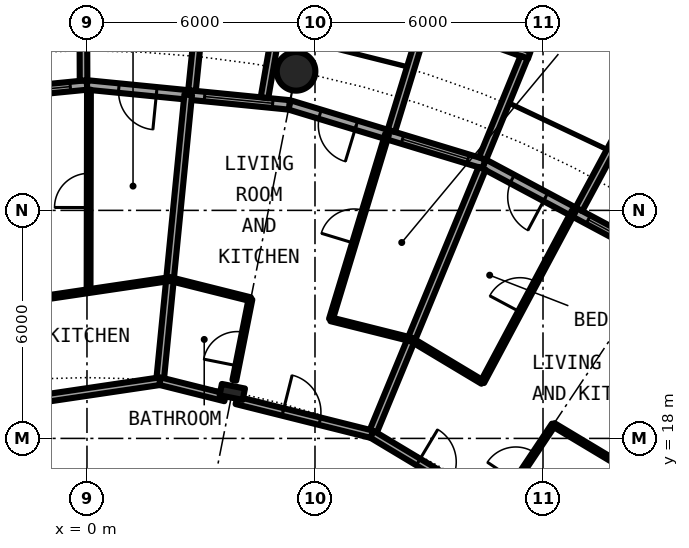
"""IFC4 building model, lengths in metres.
Left out: names, types, materials, properties, quantities, classifications, styles, units other than length and angle.
Written with IfcOpenShell. Run it as: python <this file> out.ifc"""

import sys

from ifc_helpers import new_model, si_unit, direction, frame, frame_2d, origin, origin_2d, place, context, subcontext, project, spatial, rectangle, circle, hollow_circle, i_section, extrude, element, fill, save


model = new_model("IFC4")
c1 = context("Model", 3, precision=1e-05, world=origin(), true_north=direction((0.0, 1.0)))
c2 = subcontext(c1, "Body", "Model", "MODEL_VIEW")
j1 = project(units=[si_unit("LENGTHUNIT", "METRE"), si_unit("PLANEANGLEUNIT", "RADIAN")], contexts=[c1])
p1 = place(None, origin())
s1 = spatial("IfcSite", under=j1, at=p1, CompositionType="ELEMENT")
p2 = place(p1, origin())
s2 = spatial("IfcBuilding", under=s1, at=p2, CompositionType="ELEMENT")
p3 = place(p2, frame((0.0, 0.0, 28.9)))
s3 = spatial("IfcBuildingStorey", under=s2, at=p3, CompositionType="ELEMENT", Elevation=28.9)
p4 = place(p3, frame((5.501, 27.658, 0.0), z_axis=(0.0, 0.0, 1.0), x_axis=(1.0, 0.0, 0.0)))
e1 = element("IfcColumn", 1, at=p4, inside=s3, PredefinedType="COLUMN", context=c2, shape_type="SweptSolid", body=[
    extrude(hollow_circle(Radius=0.508, WallThickness=0.05, at=origin_2d()), origin(), (0.0, 0.0, 1.0), 3.05),
])
p5 = place(p3, frame((3.824, 19.223, 0.0), z_axis=(0.0, 0.0, 1.0), x_axis=(0.195090322016, 0.980785280403, 0.0)))
e2 = element("IfcColumn", 2, at=p5, inside=s3, PredefinedType="COLUMN", context=c2, shape_type="SweptSolid", body=[
    extrude(i_section(OverallWidth=0.305, OverallDepth=0.62, WebThickness=0.021, FlangeThickness=0.04, FilletRadius=0.027, at=origin_2d()), origin(), (0.0, 0.0, 1.0), 3.05),
])
p6 = place(p3, frame((15.167, 22.699, 0.0), z_axis=(0.0, 0.0, 1.0), x_axis=(-0.881915646801, 0.471407246368, 0.0)))
e3 = element("IfcWall", 3, at=p6, inside=s3, PredefinedType="SOLIDWALL", context=c2, shape_type="SweptSolid", body=[
    extrude(rectangle(XDim=5.352, YDim=0.25, at=frame_2d((2.676, 0.0))), origin(), (0.0, 0.0, 1.0), 2.7),
])
p7 = place(p6, frame((0.441, 0.0, 0.3)))
e4 = element("IfcOpeningElement", 4, at=p7, cuts=e3, PredefinedType="OPENING", context=c2, shape_type="SweptSolid", body=[
    extrude(rectangle(XDim=1.8, YDim=2.1, at=frame_2d((0.9, 1.05))), frame((0.0, 0.135, 0.0), z_axis=(0.0, -1.0, 0.0), x_axis=(1.0, 0.0, 0.0)), (0.0, 0.0, 1.0), 0.27),
])
p8 = place(p6, frame((3.51, 0.0, 0.0)))
e5 = element("IfcOpeningElement", 5, at=p8, cuts=e3, PredefinedType="OPENING", context=c2, shape_type="SweptSolid", body=[
    extrude(rectangle(XDim=1.0, YDim=2.2, at=frame_2d((0.5, 1.1))), frame((0.0, 0.135, 0.0), z_axis=(0.0, -1.0, 0.0), x_axis=(1.0, 0.0, 0.0)), (0.0, 0.0, 1.0), 0.27),
])
p9 = place(p3, frame((12.945, 24.029, -0.03), z_axis=(0.0, 0.0, 1.0), x_axis=(0.474424310775, 0.88029629861, 0.0)))
e6 = element("IfcWall", 6, at=p9, inside=s3, PredefinedType="SOLIDWALL", context=c2, shape_type="SweptSolid", body=[
    extrude(rectangle(XDim=3.006, YDim=0.2, at=frame_2d((1.503, 0.0))), origin(), (0.0, 0.0, 1.0), 2.73),
])
p10 = place(p3, frame((10.447, 25.222, 0.0), z_axis=(0.0, 0.0, 1.0), x_axis=(-0.956965678721, 0.290201119486, 0.0)))
e7 = element("IfcWall", 7, at=p10, inside=s3, PredefinedType="SOLIDWALL", context=c2, shape_type="SweptSolid", body=[
    extrude(rectangle(XDim=5.351, YDim=0.25, at=frame_2d((2.676, 0.0))), origin(), (0.0, 0.0, 1.0), 2.7),
])
p11 = place(p10, frame((0.441, 0.0, 0.3)))
e8 = element("IfcOpeningElement", 8, at=p11, cuts=e7, PredefinedType="OPENING", context=c2, shape_type="SweptSolid", body=[
    extrude(rectangle(XDim=1.8, YDim=2.1, at=frame_2d((0.9, 1.05))), frame((0.0, 0.135, 0.0), z_axis=(0.0, -1.0, 0.0), x_axis=(1.0, 0.0, 0.0)), (0.0, 0.0, 1.0), 0.27),
])
p12 = place(p10, frame((3.51, 0.0, 0.0)))
e9 = element("IfcOpeningElement", 9, at=p12, cuts=e7, PredefinedType="OPENING", context=c2, shape_type="SweptSolid", body=[
    extrude(rectangle(XDim=1.0, YDim=2.2, at=frame_2d((0.5, 1.1))), frame((0.0, 0.135, 0.0), z_axis=(0.0, -1.0, 0.0), x_axis=(1.0, 0.0, 0.0)), (0.0, 0.0, 1.0), 0.27),
])
p13 = place(p3, frame((11.638, 28.084, -0.03), z_axis=(0.0, 0.0, 1.0), x_axis=(-0.941461077774, 0.337121697664, 0.0)))
e10 = element("IfcWall", 10, at=p13, inside=s3, PredefinedType="SOLIDWALL", context=c2, shape_type="SweptSolid", body=[
    extrude(rectangle(XDim=2.993, YDim=0.2, at=frame_2d((1.497, 0.0))), origin(), (0.0, 0.0, 1.0), 2.73),
])
p14 = place(p13, frame((0.457, 0.0, 0.33)))
e11 = element("IfcOpeningElement", 11, at=p14, cuts=e10, PredefinedType="OPENING", context=c2, shape_type="SweptSolid", body=[
    extrude(circle(Radius=1.04, at=frame_2d((1.04, 1.04))), frame((0.0, 0.11, 0.0), z_axis=(0.0, -1.0, 0.0), x_axis=(1.0, 0.0, 0.0)), (0.0, 0.0, 1.0), 0.22),
])
p15 = place(p3, frame((10.409, 25.364, -0.03), z_axis=(0.0, 0.0, 1.0), x_axis=(0.379509886562, 0.925187681501, 0.0)))
e12 = element("IfcWall", 12, at=p15, inside=s3, PredefinedType="SOLIDWALL", context=c2, shape_type="SweptSolid", body=[
    extrude(rectangle(XDim=2.883, YDim=0.2, at=frame_2d((1.441, 0.0))), origin(), (0.0, 0.0, 1.0), 2.73),
])
p16 = place(p3, frame((8.009, 26.092, -0.03), z_axis=(0.0, 0.0, 1.0), x_axis=(0.293406695073, 0.955987715029, 0.0)))
e13 = element("IfcWall", 13, at=p16, inside=s3, PredefinedType="SOLIDWALL", context=c2, shape_type="SweptSolid", body=[
    extrude(rectangle(XDim=3.006, YDim=0.2, at=frame_2d((1.503, 0.0))), origin(), (0.0, 0.0, 1.0), 2.73),
])
p17 = place(p3, frame((5.326, 26.775, 0.0), z_axis=(0.0, 0.0, 1.0), x_axis=(-0.995173996315, 0.098126026407, 0.0)))
e14 = element("IfcWall", 14, at=p17, inside=s3, PredefinedType="SOLIDWALL", context=c2, shape_type="SweptSolid", body=[
    extrude(rectangle(XDim=5.352, YDim=0.25, at=frame_2d((2.676, 0.0))), origin(), (0.0, 0.0, 1.0), 2.7),
])
p18 = place(p17, frame((0.441, 0.0, 0.3)))
e15 = element("IfcOpeningElement", 15, at=p18, cuts=e14, PredefinedType="OPENING", context=c2, shape_type="SweptSolid", body=[
    extrude(rectangle(XDim=1.8, YDim=2.1, at=frame_2d((0.9, 1.05))), frame((0.0, 0.135, 0.0), z_axis=(0.0, -1.0, 0.0), x_axis=(1.0, 0.0, 0.0)), (0.0, 0.0, 1.0), 0.27),
])
p19 = place(p17, frame((3.51, 0.0, 0.0)))
e16 = element("IfcOpeningElement", 16, at=p19, cuts=e14, PredefinedType="OPENING", context=c2, shape_type="SweptSolid", body=[
    extrude(rectangle(XDim=1.0, YDim=2.2, at=frame_2d((0.5, 1.1))), frame((0.0, 0.135, 0.0), z_axis=(0.0, -1.0, 0.0), x_axis=(1.0, 0.0, 0.0)), (0.0, 0.0, 1.0), 0.27),
])
p20 = place(p3, frame((4.671, 26.966, -0.03), z_axis=(0.0, 0.0, 1.0), x_axis=(0.170539878907, 0.985350774954, 0.0)))
e17 = element("IfcWall", 17, at=p20, inside=s3, PredefinedType="SOLIDWALL", context=c2, shape_type="SweptSolid", body=[
    extrude(rectangle(XDim=2.932, YDim=0.2, at=frame_2d((1.466, 0.0))), origin(), (0.0, 0.0, 1.0), 2.73),
])
p21 = place(p3, frame((2.764, 27.153, -0.03), z_axis=(0.0, 0.0, 1.0), x_axis=(0.101505487237, 0.994834979311, 0.0)))
e18 = element("IfcWall", 18, at=p21, inside=s3, PredefinedType="SOLIDWALL", context=c2, shape_type="SweptSolid", body=[
    extrude(rectangle(XDim=3.007, YDim=0.2, at=frame_2d((1.503, 0.0))), origin(), (0.0, 0.0, 1.0), 2.73),
])
p22 = place(p3, frame((0.0, 27.3, 0.0), z_axis=(0.0, 0.0, 1.0), x_axis=(-0.995173996315, -0.098126026407, 0.0)))
e19 = element("IfcWall", 19, at=p22, inside=s3, PredefinedType="SOLIDWALL", context=c2, shape_type="SweptSolid", body=[
    extrude(rectangle(XDim=5.352, YDim=0.25, at=frame_2d((2.676, 0.0))), origin(), (0.0, 0.0, 1.0), 2.7),
])
p23 = place(p22, frame((0.441, 0.0, 0.3)))
e20 = element("IfcOpeningElement", 20, at=p23, cuts=e19, PredefinedType="OPENING", context=c2, shape_type="SweptSolid", body=[
    extrude(rectangle(XDim=1.8, YDim=2.1, at=frame_2d((0.9, 1.05))), frame((0.0, 0.135, 0.0), z_axis=(0.0, -1.0, 0.0), x_axis=(1.0, 0.0, 0.0)), (0.0, 0.0, 1.0), 0.27),
])
p24 = place(p22, frame((3.51, 0.0, 0.0)))
e21 = element("IfcOpeningElement", 21, at=p24, cuts=e19, PredefinedType="OPENING", context=c2, shape_type="SweptSolid", body=[
    extrude(rectangle(XDim=1.0, YDim=2.2, at=frame_2d((0.5, 1.1))), frame((0.0, 0.135, 0.0), z_axis=(0.0, -1.0, 0.0), x_axis=(1.0, 0.0, 0.0)), (0.0, 0.0, 1.0), 0.27),
])
p25 = place(p3, frame((-0.09, 27.417, -0.03), z_axis=(0.0, 0.0, 1.0), x_axis=(-0.00347308367, 0.999993968827, 0.0)))
e22 = element("IfcWall", 22, at=p25, inside=s3, PredefinedType="SOLIDWALL", context=c2, shape_type="SweptSolid", body=[
    extrude(rectangle(XDim=2.882, YDim=0.2, at=frame_2d((1.441, 0.0))), origin(), (0.0, 0.0, 1.0), 2.73),
])
p26 = place(p3, frame((0.042, 21.875, 0.0), z_axis=(0.0, 0.0, 1.0), x_axis=(0.001888614256, 0.999998216567, 0.0)))
e23 = element("IfcWall", 23, at=p26, inside=s3, PredefinedType="PARTITIONING", context=c2, shape_type="SweptSolid", body=[
    extrude(rectangle(XDim=5.3, YDim=0.1, at=frame_2d((2.65, 0.0))), origin(), (0.0, 0.0, 1.0), 2.7),
])
p27 = place(p26, frame((2.2, 0.0, 0.0)))
e24 = element("IfcOpeningElement", 24, at=p27, cuts=e23, PredefinedType="OPENING", context=c2, shape_type="SweptSolid", body=[
    extrude(rectangle(XDim=0.9, YDim=2.3, at=frame_2d((0.45, 1.15))), frame((0.0, 0.06, 0.0), z_axis=(0.0, -1.0, 0.0), x_axis=(1.0, 0.0, 0.0)), (0.0, 0.0, 1.0), 0.12),
])
p28 = place(p3, frame((1.921, 19.506, 0.0), z_axis=(0.0, 0.0, 1.0), x_axis=(0.098115395479, 0.995175044487, 0.0)))
e25 = element("IfcWall", 25, at=p28, inside=s3, PredefinedType="PARTITIONING", context=c2, shape_type="SweptSolid", body=[
    extrude(rectangle(XDim=7.574, YDim=0.2, at=frame_2d((3.787, 0.0))), origin(), (0.0, 0.0, 1.0), 2.7),
])
p29 = place(p3, frame((3.878, 19.529, 0.0), z_axis=(0.0, 0.0, 1.0), x_axis=(0.194907578226, 0.980821612706, 0.0)))
e26 = element("IfcWall", 26, at=p29, inside=s3, PredefinedType="PARTITIONING", context=c2, shape_type="SweptSolid", body=[
    extrude(rectangle(XDim=2.176, YDim=0.1, at=frame_2d((1.088, 0.0))), origin(), (0.0, 0.0, 1.0), 2.7),
])
p30 = place(p29, frame((0.389, 0.0, 0.0)))
e27 = element("IfcOpeningElement", 27, at=p30, cuts=e26, PredefinedType="OPENING", context=c2, shape_type="SweptSolid", body=[
    extrude(rectangle(XDim=0.9, YDim=2.3, at=frame_2d((0.45, 1.15))), frame((0.0, 0.06, 0.0), z_axis=(0.0, -1.0, 0.0), x_axis=(1.0, 0.0, 0.0)), (0.0, 0.0, 1.0), 0.12),
])
p31 = place(p3, frame((6.418, 21.133, 0.0), z_axis=(0.0, 0.0, 1.0), x_axis=(0.290651827018, 0.956828885147, 0.0)))
e28 = element("IfcWall", 28, at=p31, inside=s3, PredefinedType="PARTITIONING", context=c2, shape_type="SweptSolid", body=[
    extrude(rectangle(XDim=5.089, YDim=0.1, at=frame_2d((2.544, 0.0))), origin(), (0.0, 0.0, 1.0), 2.7),
])
p32 = place(p31, frame((2.094, 0.0, 0.0)))
e29 = element("IfcOpeningElement", 29, at=p32, cuts=e28, PredefinedType="OPENING", context=c2, shape_type="SweptSolid", body=[
    extrude(rectangle(XDim=0.9, YDim=2.3, at=frame_2d((0.45, 1.15))), frame((0.0, 0.06, 0.0), z_axis=(0.0, -1.0, 0.0), x_axis=(1.0, 0.0, 0.0)), (0.0, 0.0, 1.0), 0.12),
])
p33 = place(p3, frame((7.501, 18.108, 0.0), z_axis=(0.0, 0.0, 1.0), x_axis=(0.382490346157, 0.923959487801, 0.0)))
e30 = element("IfcWall", 30, at=p33, inside=s3, PredefinedType="PARTITIONING", context=c2, shape_type="SweptSolid", body=[
    extrude(rectangle(XDim=7.574, YDim=0.2, at=frame_2d((3.787, 0.0))), origin(), (0.0, 0.0, 1.0), 2.7),
])
p34 = place(p3, frame((10.405, 19.481, 0.0), z_axis=(0.0, 0.0, 1.0), x_axis=(0.471170755767, 0.882042016522, 0.0)))
e31 = element("IfcWall", 31, at=p34, inside=s3, PredefinedType="PARTITIONING", context=c2, shape_type="SweptSolid", body=[
    extrude(rectangle(XDim=5.089, YDim=0.1, at=frame_2d((2.545, 0.0))), origin(), (0.0, 0.0, 1.0), 2.7),
])
p35 = place(p34, frame((2.095, 0.0, 0.0)))
e32 = element("IfcOpeningElement", 32, at=p35, cuts=e31, PredefinedType="OPENING", context=c2, shape_type="SweptSolid", body=[
    extrude(rectangle(XDim=0.9, YDim=2.3, at=frame_2d((0.45, 1.15))), frame((0.0, 0.06, 0.0), z_axis=(0.0, -1.0, 0.0), x_axis=(1.0, 0.0, 0.0)), (0.0, 0.0, 1.0), 0.12),
])
p36 = place(p3, frame((11.067, 16.551, 0.0), z_axis=(0.0, 0.0, 1.0), x_axis=(0.55563200073, 0.831428337119, 0.0)))
e33 = element("IfcWall", 33, at=p36, inside=s3, PredefinedType="PARTITIONING", context=c2, shape_type="SweptSolid", body=[
    extrude(rectangle(XDim=2.176, YDim=0.1, at=frame_2d((1.088, 0.0))), origin(), (0.0, 0.0, 1.0), 2.7),
])
p37 = place(p36, frame((0.389, 0.0, 0.0)))
e34 = element("IfcOpeningElement", 34, at=p37, cuts=e33, PredefinedType="OPENING", context=c2, shape_type="SweptSolid", body=[
    extrude(rectangle(XDim=0.9, YDim=2.3, at=frame_2d((0.45, 1.15))), frame((0.0, 0.06, 0.0), z_axis=(0.0, -1.0, 0.0), x_axis=(1.0, 0.0, 0.0)), (0.0, 0.0, 1.0), 0.12),
])
p38 = place(p3, frame((12.434, 15.151, 0.0), z_axis=(0.0, 0.0, 1.0), x_axis=(0.634381303318, 0.773020285633, 0.0)))
e35 = element("IfcWall", 35, at=p38, inside=s3, PredefinedType="PARTITIONING", context=c2, shape_type="SweptSolid", body=[
    extrude(rectangle(XDim=7.576, YDim=0.2, at=frame_2d((3.788, 0.0))), origin(), (0.0, 0.0, 1.0), 2.7),
])
p39 = place(p3, frame((-7.501, 18.108, 0.0), z_axis=(0.0, 0.0, 1.0), x_axis=(0.989167514259, 0.146791105777, 0.0)))
e36 = element("IfcWall", 36, at=p39, inside=s3, PredefinedType="PARTITIONING", context=c2, shape_type="SweptSolid", body=[
    extrude(rectangle(XDim=9.525, YDim=0.2, at=frame_2d((4.763, 0.0))), origin(), (0.0, 0.0, 1.0), 2.38),
])
p40 = place(p39, frame((2.355, 0.0, 0.0)))
e37 = element("IfcOpeningElement", 37, at=p40, cuts=e36, PredefinedType="OPENING", context=c2, shape_type="SweptSolid", body=[
    extrude(rectangle(XDim=1.0, YDim=2.3, at=frame_2d((0.5, 1.15))), frame((0.0, 0.11, 0.0), z_axis=(0.0, -1.0, 0.0), x_axis=(1.0, 0.0, 0.0)), (0.0, 0.0, 1.0), 0.22),
])
p41 = place(p3, frame((1.921, 19.506, 0.0), z_axis=(0.0, 0.0, 1.0), x_axis=(0.970053237222, -0.242892397895, 0.0)))
e38 = element("IfcWall", 38, at=p41, inside=s3, PredefinedType="PARTITIONING", context=c2, shape_type="SweptSolid", body=[
    extrude(rectangle(XDim=1.771, YDim=0.2, at=frame_2d((0.885, 0.0))), origin(), (0.0, 0.0, 1.0), 2.38),
])
p42 = place(p3, frame((3.935, 19.001, 0.0), z_axis=(0.0, 0.0, 1.0), x_axis=(0.970040840928, -0.242941900323, 0.0)))
e39 = element("IfcWall", 39, at=p42, inside=s3, PredefinedType="PARTITIONING", context=c2, shape_type="SweptSolid", body=[
    extrude(rectangle(XDim=3.676, YDim=0.2, at=frame_2d((1.838, 0.0))), origin(), (0.0, 0.0, 1.0), 2.38),
])
p43 = place(p42, frame((1.259, 0.0, 0.0)))
e40 = element("IfcOpeningElement", 40, at=p43, cuts=e39, PredefinedType="OPENING", context=c2, shape_type="SweptSolid", body=[
    extrude(rectangle(XDim=1.0, YDim=2.3, at=frame_2d((0.5, 1.15))), frame((0.0, 0.11, 0.0), z_axis=(0.0, -1.0, 0.0), x_axis=(1.0, 0.0, 0.0)), (0.0, 0.0, 1.0), 0.22),
])
p44 = place(p3, frame((7.501, 18.108, 0.0), z_axis=(0.0, 0.0, 1.0), x_axis=(0.857656999296, -0.514222200569, 0.0)))
e41 = element("IfcWall", 41, at=p44, inside=s3, PredefinedType="PARTITIONING", context=c2, shape_type="SweptSolid", body=[
    extrude(rectangle(XDim=3.675, YDim=0.2, at=frame_2d((1.838, 0.0))), origin(), (0.0, 0.0, 1.0), 2.38),
])
p45 = place(p44, frame((1.418, 0.0, 0.0)))
e42 = element("IfcOpeningElement", 42, at=p45, cuts=e41, PredefinedType="OPENING", context=c2, shape_type="SweptSolid", body=[
    extrude(rectangle(XDim=1.0, YDim=2.3, at=frame_2d((0.5, 1.15))), frame((0.0, 0.11, 0.0), z_axis=(0.0, -1.0, 0.0), x_axis=(1.0, 0.0, 0.0)), (0.0, 0.0, 1.0), 0.22),
])
p46 = place(p3, frame((-2.102, 21.557, 0.0), z_axis=(0.0, 0.0, 1.0), x_axis=(0.989171386505, 0.146765009863, 0.0)))
e43 = element("IfcWall", 43, at=p46, inside=s3, PredefinedType="PARTITIONING", context=c2, shape_type="SweptSolid", body=[
    extrude(rectangle(XDim=4.335, YDim=0.1, at=frame_2d((2.167, 0.0))), origin(), (0.0, 0.0, 1.0), 2.7),
])
for number, where, z_axis, x_axis in (
    (44, (2.186, 22.193, 0.0), (0.0, 0.0, 1.0), (0.97, -0.243, 0.0)),
    (45, (6.418, 21.133, 0.0), (0.0, 0.0, 1.0), (0.97, -0.243, 0.0)),
):
    element("IfcWall", number, at=place(p3, frame(where, z_axis=z_axis, x_axis=x_axis)), inside=s3, PredefinedType="PARTITIONING", context=c2, shape_type="SweptSolid", body=[
        extrude(rectangle(XDim=2.181, YDim=0.1, at=frame_2d((1.091, 0.0))), origin(), (0.0, 0.0, 1.0), 2.7),
    ])
for number, where, z_axis, x_axis in (
    (46, (8.534, 20.603, 0.0), (0.0, 0.0, 1.0), (0.858, -0.514, 0.0)),
    (47, (12.276, 18.359, 0.0), (0.0, 0.0, 1.0), (0.858, -0.514, 0.0)),
):
    element("IfcWall", number, at=place(p3, frame(where, z_axis=z_axis, x_axis=x_axis)), inside=s3, PredefinedType="PARTITIONING", context=c2, shape_type="SweptSolid", body=[
        extrude(rectangle(XDim=2.182, YDim=0.1, at=frame_2d((1.091, 0.0))), origin(), (0.0, 0.0, 1.0), 2.7),
    ])
p47 = place(p7, origin())
e48 = element("IfcWindow", 48, at=p47, inside=s3, PartitioningType="SINGLE_PANEL", PredefinedType="WINDOW", context=c2, shape_type="SweptSolid", body=[
    extrude(rectangle(XDim=1.8, YDim=2.1, at=frame_2d((0.9, 1.05))), frame((0.0, 0.03, 0.0), z_axis=(0.0, -1.0, 0.0), x_axis=(1.0, 0.0, 0.0)), (0.0, 0.0, 1.0), 0.06),
])
fill(e4, e48)
p48 = place(p8, origin())
e49 = element("IfcDoor", 49, at=p48, inside=s3, OperationType="SINGLE_SWING_LEFT", PredefinedType="DOOR", context=c2, shape_type="SweptSolid", body=[
    extrude(rectangle(XDim=1.0, YDim=2.2, at=frame_2d((0.5, 1.1))), frame((0.0, 0.025, 0.0), z_axis=(0.0, -1.0, 0.0), x_axis=(1.0, 0.0, 0.0)), (0.0, 0.0, 1.0), 0.05),
])
fill(e5, e49)
p49 = place(p11, origin())
e50 = element("IfcWindow", 50, at=p49, inside=s3, PartitioningType="SINGLE_PANEL", PredefinedType="WINDOW", context=c2, shape_type="SweptSolid", body=[
    extrude(rectangle(XDim=1.8, YDim=2.1, at=frame_2d((0.9, 1.05))), frame((0.0, 0.03, 0.0), z_axis=(0.0, -1.0, 0.0), x_axis=(1.0, 0.0, 0.0)), (0.0, 0.0, 1.0), 0.06),
])
fill(e8, e50)
p50 = place(p12, origin())
e51 = element("IfcDoor", 51, at=p50, inside=s3, OperationType="SINGLE_SWING_LEFT", PredefinedType="DOOR", context=c2, shape_type="SweptSolid", body=[
    extrude(rectangle(XDim=1.0, YDim=2.2, at=frame_2d((0.5, 1.1))), frame((0.0, 0.025, 0.0), z_axis=(0.0, -1.0, 0.0), x_axis=(1.0, 0.0, 0.0)), (0.0, 0.0, 1.0), 0.05),
])
fill(e9, e51)
p51 = place(p18, origin())
e52 = element("IfcWindow", 52, at=p51, inside=s3, PartitioningType="SINGLE_PANEL", PredefinedType="WINDOW", context=c2, shape_type="SweptSolid", body=[
    extrude(rectangle(XDim=1.8, YDim=2.1, at=frame_2d((0.9, 1.05))), frame((0.0, 0.03, 0.0), z_axis=(0.0, -1.0, 0.0), x_axis=(1.0, 0.0, 0.0)), (0.0, 0.0, 1.0), 0.06),
])
fill(e15, e52)
p52 = place(p19, origin())
e53 = element("IfcDoor", 53, at=p52, inside=s3, OperationType="SINGLE_SWING_LEFT", PredefinedType="DOOR", context=c2, shape_type="SweptSolid", body=[
    extrude(rectangle(XDim=1.0, YDim=2.2, at=frame_2d((0.5, 1.1))), frame((0.0, 0.025, 0.0), z_axis=(0.0, -1.0, 0.0), x_axis=(1.0, 0.0, 0.0)), (0.0, 0.0, 1.0), 0.05),
])
fill(e16, e53)
p53 = place(p23, origin())
e54 = element("IfcWindow", 54, at=p53, inside=s3, PartitioningType="SINGLE_PANEL", PredefinedType="WINDOW", context=c2, shape_type="SweptSolid", body=[
    extrude(rectangle(XDim=1.8, YDim=2.1, at=frame_2d((0.9, 1.05))), frame((0.0, 0.03, 0.0), z_axis=(0.0, -1.0, 0.0), x_axis=(1.0, 0.0, 0.0)), (0.0, 0.0, 1.0), 0.06),
])
fill(e20, e54)
p54 = place(p45, origin())
e55 = element("IfcDoor", 55, at=p54, inside=s3, OperationType="SINGLE_SWING_RIGHT", PredefinedType="DOOR", context=c2, shape_type="SweptSolid", body=[
    extrude(rectangle(XDim=1.0, YDim=2.3, at=frame_2d((0.5, 1.15))), frame((0.0, 0.025, 0.0), z_axis=(0.0, -1.0, 0.0), x_axis=(1.0, 0.0, 0.0)), (0.0, 0.0, 1.0), 0.05),
])
fill(e42, e55)
p55 = place(p37, origin())
e56 = element("IfcDoor", 56, at=p55, inside=s3, OperationType="SINGLE_SWING_LEFT", PredefinedType="DOOR", context=c2, shape_type="SweptSolid", body=[
    extrude(rectangle(XDim=0.9, YDim=2.3, at=frame_2d((0.45, 1.15))), frame((0.0, 0.025, 0.0), z_axis=(0.0, -1.0, 0.0), x_axis=(1.0, 0.0, 0.0)), (0.0, 0.0, 1.0), 0.05),
])
fill(e34, e56)
p56 = place(p35, origin())
e57 = element("IfcDoor", 57, at=p56, inside=s3, OperationType="SINGLE_SWING_RIGHT", PredefinedType="DOOR", context=c2, shape_type="SweptSolid", body=[
    extrude(rectangle(XDim=0.9, YDim=2.3, at=frame_2d((0.45, 1.15))), frame((0.0, 0.025, 0.0), z_axis=(0.0, -1.0, 0.0), x_axis=(1.0, 0.0, 0.0)), (0.0, 0.0, 1.0), 0.05),
])
fill(e32, e57)
p57 = place(p43, origin())
e58 = element("IfcDoor", 58, at=p57, inside=s3, OperationType="SINGLE_SWING_LEFT", PredefinedType="DOOR", context=c2, shape_type="SweptSolid", body=[
    extrude(rectangle(XDim=1.0, YDim=2.3, at=frame_2d((0.5, 1.15))), frame((0.0, 0.025, 0.0), z_axis=(0.0, -1.0, 0.0), x_axis=(1.0, 0.0, 0.0)), (0.0, 0.0, 1.0), 0.05),
])
fill(e40, e58)
p58 = place(p30, origin())
e59 = element("IfcDoor", 59, at=p58, inside=s3, OperationType="SINGLE_SWING_LEFT", PredefinedType="DOOR", context=c2, shape_type="SweptSolid", body=[
    extrude(rectangle(XDim=0.9, YDim=2.3, at=frame_2d((0.45, 1.15))), frame((0.0, 0.025, 0.0), z_axis=(0.0, -1.0, 0.0), x_axis=(1.0, 0.0, 0.0)), (0.0, 0.0, 1.0), 0.05),
])
fill(e27, e59)
p59 = place(p32, origin())
e60 = element("IfcDoor", 60, at=p59, inside=s3, OperationType="SINGLE_SWING_LEFT", PredefinedType="DOOR", context=c2, shape_type="SweptSolid", body=[
    extrude(rectangle(XDim=0.9, YDim=2.3, at=frame_2d((0.45, 1.15))), frame((0.0, 0.025, 0.0), z_axis=(0.0, -1.0, 0.0), x_axis=(1.0, 0.0, 0.0)), (0.0, 0.0, 1.0), 0.05),
])
fill(e29, e60)
p60 = place(p27, origin())
e61 = element("IfcDoor", 61, at=p60, inside=s3, OperationType="SINGLE_SWING_RIGHT", PredefinedType="DOOR", context=c2, shape_type="SweptSolid", body=[
    extrude(rectangle(XDim=0.9, YDim=2.3, at=frame_2d((0.45, 1.15))), frame((0.0, 0.025, 0.0), z_axis=(0.0, -1.0, 0.0), x_axis=(1.0, 0.0, 0.0)), (0.0, 0.0, 1.0), 0.05),
])
fill(e24, e61)
save(model, sys.argv[1])
